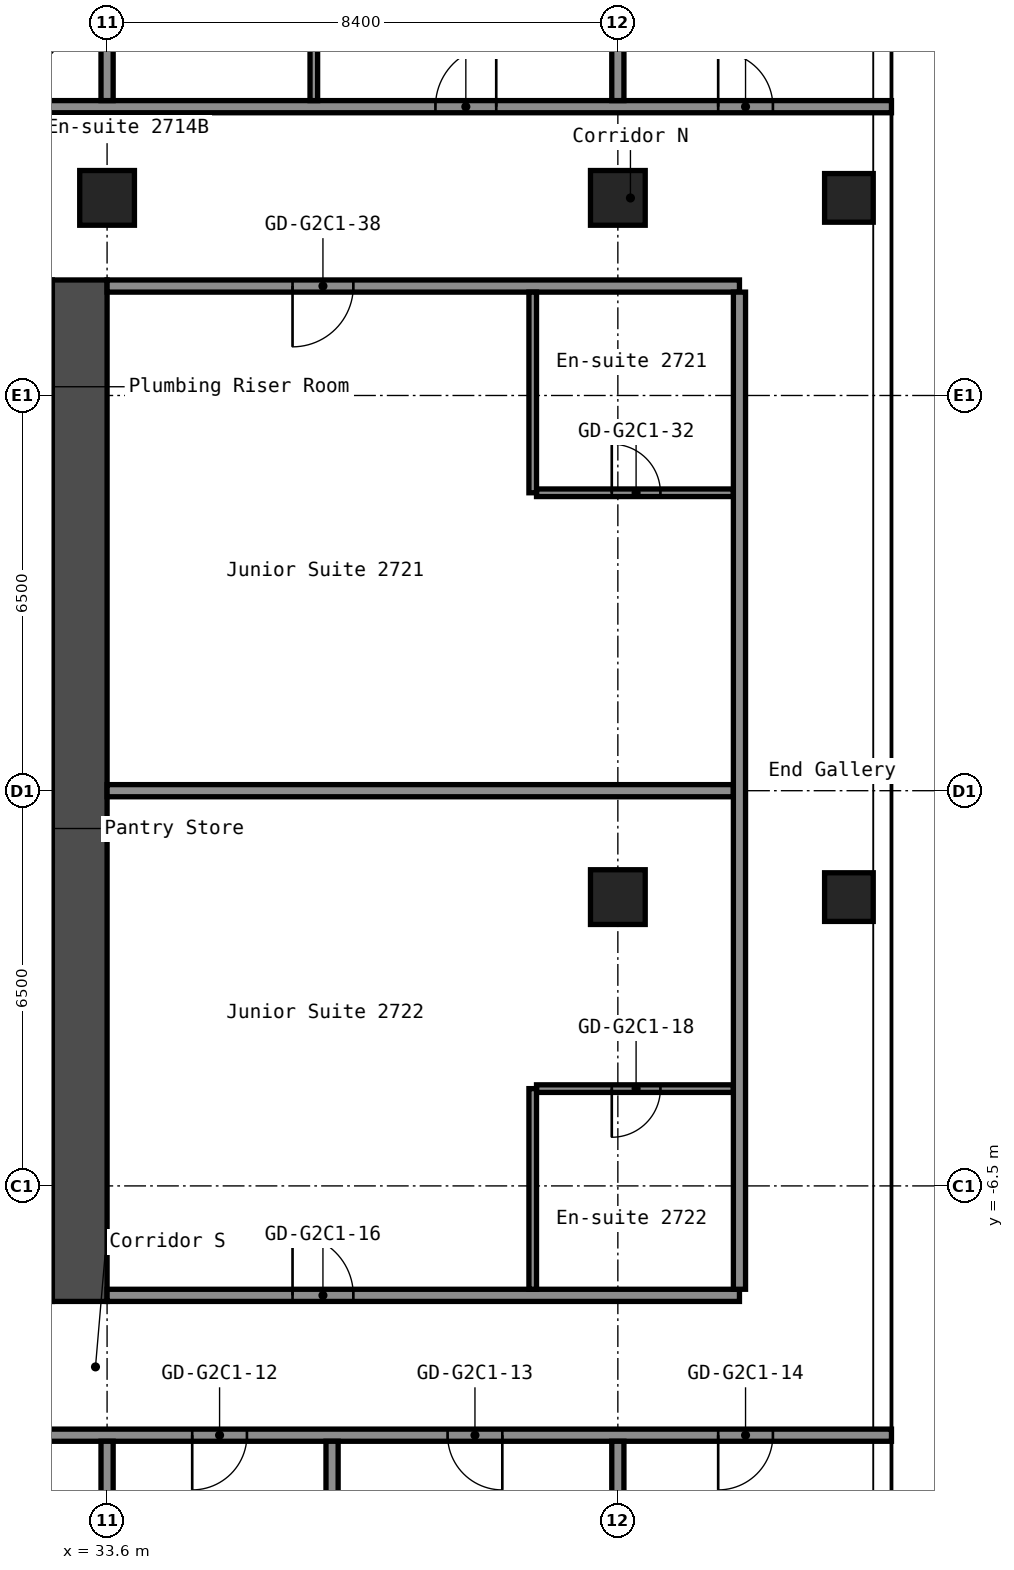
"""IFC4 building model, lengths in metres.
Left out: names, types, materials, properties, quantities, classifications, styles, units other than length and angle.
Written with IfcOpenShell. Run it as: python <this file> out.ifc"""

import sys

from ifc_helpers import new_model, si_unit, direction, frame, frame_2d, origin, origin_2d, place, context, subcontext, project, spatial, rectangle, hollow_rectangle, extrude, element, fill, save


model = new_model("IFC4")
c1 = context("Model", 3, precision=1e-05, world=origin(), true_north=direction((0.0, 1.0)))
c2 = subcontext(c1, "Body", "Model", "MODEL_VIEW")
j1 = project(units=[si_unit("LENGTHUNIT", "METRE"), si_unit("PLANEANGLEUNIT", "RADIAN")], contexts=[c1])
p1 = place(None, origin())
s1 = spatial("IfcSite", under=j1, at=p1, CompositionType="ELEMENT")
p2 = place(p1, origin())
s2 = spatial("IfcBuilding", under=s1, at=p2, CompositionType="ELEMENT")
p3 = place(p2, frame((0.0, 0.0, 97.8)))
s3 = spatial("IfcBuildingStorey", under=s2, at=p3, CompositionType="ELEMENT", Elevation=97.8)
for number, where, z_axis, x_axis in (
    (1, (33.6, 9.75, 0.0), (0.0, 0.0, 1.0), (1.0, 0.0, 0.0)),
    (2, (42.0, -1.75, 0.0), (0.0, 0.0, 1.0), (1.0, 0.0, 0.0)),
    (3, (42.0, 9.75, 0.0), (0.0, 0.0, 1.0), (1.0, 0.0, 0.0)),
):
    element("IfcColumn", number, at=place(p3, frame(where, z_axis=z_axis, x_axis=x_axis)), inside=s3, PredefinedType="COLUMN", context=c2, shape_type="SweptSolid", body=[
        extrude(hollow_rectangle(XDim=0.9, YDim=0.9, WallThickness=0.036, at=origin_2d()), origin(), (0.0, 0.0, 1.0), 2.8),
    ])
for number, where, z_axis, x_axis in (
    (4, (45.8, -1.75, 0.0), (0.0, 0.0, 1.0), (1.0, 0.0, 0.0)),
    (5, (45.8, 9.75, 0.0), (0.0, 0.0, 1.0), (1.0, 0.0, 0.0)),
):
    element("IfcColumn", number, at=place(p3, frame(where, z_axis=z_axis, x_axis=x_axis)), inside=s3, PredefinedType="COLUMN", context=c2, shape_type="SweptSolid", body=[
        extrude(hollow_rectangle(XDim=0.8, YDim=0.8, WallThickness=0.032, at=origin_2d()), origin(), (0.0, 0.0, 1.0), 2.8),
    ])
p4 = place(p3, frame((33.15, -8.4, 0.0), z_axis=(0.0, 0.0, 1.0), x_axis=(0.0, 1.0, 0.0)))
e6 = element("IfcWall", 6, at=p4, inside=s3, PredefinedType="SHEAR", context=c2, shape_type="SweptSolid", body=[
    extrude(rectangle(XDim=16.8, YDim=0.9, at=frame_2d((8.4, 0.0))), origin(), (0.0, 0.0, 1.0), 2.8),
])
p5 = place(p3, frame((16.8, -10.6, 0.0), z_axis=(0.0, 0.0, 1.0), x_axis=(1.0, 0.0, 0.0)))
e7 = element("IfcWall", 7, at=p5, inside=s3, PredefinedType="PARTITIONING", context=c2, shape_type="SweptSolid", body=[
    extrude(rectangle(XDim=29.7, YDim=0.2, at=frame_2d((14.85, 0.0))), origin(), (0.0, 0.0, 1.0), 2.8),
])
p6 = place(p5, frame((2.155, 0.0, 0.0)))
e8 = element("IfcOpeningElement", 8, at=p6, cuts=e7, PredefinedType="OPENING", context=c2, shape_type="SweptSolid", body=[
    extrude(rectangle(XDim=0.9, YDim=2.1, at=frame_2d((0.45, 1.05))), frame((0.0, 0.11, 0.0), z_axis=(0.0, -1.0, 0.0), x_axis=(1.0, 0.0, 0.0)), (0.0, 0.0, 1.0), 0.22),
])
p7 = place(p5, frame((6.355, 0.0, 0.0)))
e9 = element("IfcOpeningElement", 9, at=p7, cuts=e7, PredefinedType="OPENING", context=c2, shape_type="SweptSolid", body=[
    extrude(rectangle(XDim=0.9, YDim=2.1, at=frame_2d((0.45, 1.05))), frame((0.0, 0.11, 0.0), z_axis=(0.0, -1.0, 0.0), x_axis=(1.0, 0.0, 0.0)), (0.0, 0.0, 1.0), 0.22),
])
p8 = place(p5, frame((10.22, 0.0, 0.0)))
e10 = element("IfcOpeningElement", 10, at=p8, cuts=e7, PredefinedType="OPENING", context=c2, shape_type="SweptSolid", body=[
    extrude(rectangle(XDim=0.9, YDim=2.1, at=frame_2d((0.45, 1.05))), frame((0.0, 0.11, 0.0), z_axis=(0.0, -1.0, 0.0), x_axis=(1.0, 0.0, 0.0)), (0.0, 0.0, 1.0), 0.22),
])
p9 = place(p5, frame((14.42, 0.0, 0.0)))
e11 = element("IfcOpeningElement", 11, at=p9, cuts=e7, PredefinedType="OPENING", context=c2, shape_type="SweptSolid", body=[
    extrude(rectangle(XDim=0.9, YDim=2.1, at=frame_2d((0.45, 1.05))), frame((0.0, 0.11, 0.0), z_axis=(0.0, -1.0, 0.0), x_axis=(1.0, 0.0, 0.0)), (0.0, 0.0, 1.0), 0.22),
])
p10 = place(p5, frame((18.2, 0.0, 0.0)))
e12 = element("IfcOpeningElement", 12, at=p10, cuts=e7, PredefinedType="OPENING", context=c2, shape_type="SweptSolid", body=[
    extrude(rectangle(XDim=0.9, YDim=2.1, at=frame_2d((0.45, 1.05))), frame((0.0, 0.11, 0.0), z_axis=(0.0, -1.0, 0.0), x_axis=(1.0, 0.0, 0.0)), (0.0, 0.0, 1.0), 0.22),
])
p11 = place(p5, frame((22.4, 0.0, 0.0)))
e13 = element("IfcOpeningElement", 13, at=p11, cuts=e7, PredefinedType="OPENING", context=c2, shape_type="SweptSolid", body=[
    extrude(rectangle(XDim=0.9, YDim=2.1, at=frame_2d((0.45, 1.05))), frame((0.0, 0.11, 0.0), z_axis=(0.0, -1.0, 0.0), x_axis=(1.0, 0.0, 0.0)), (0.0, 0.0, 1.0), 0.22),
])
p12 = place(p5, frame((26.85, 0.0, 0.0)))
e14 = element("IfcOpeningElement", 14, at=p12, cuts=e7, PredefinedType="OPENING", context=c2, shape_type="SweptSolid", body=[
    extrude(rectangle(XDim=0.9, YDim=2.1, at=frame_2d((0.45, 1.05))), frame((0.0, 0.11, 0.0), z_axis=(0.0, -1.0, 0.0), x_axis=(1.0, 0.0, 0.0)), (0.0, 0.0, 1.0), 0.22),
])
p13 = place(p3, frame((33.6, -8.3, 0.0), z_axis=(0.0, 0.0, 1.0), x_axis=(1.0, 0.0, 0.0)))
e15 = element("IfcWall", 15, at=p13, inside=s3, PredefinedType="PARTITIONING", context=c2, shape_type="SweptSolid", body=[
    extrude(rectangle(XDim=10.4, YDim=0.2, at=frame_2d((5.2, 0.0))), origin(), (0.0, 0.0, 1.0), 2.8),
])
p14 = place(p13, frame((3.05, 0.0, 0.0)))
e16 = element("IfcOpeningElement", 16, at=p14, cuts=e15, PredefinedType="OPENING", context=c2, shape_type="SweptSolid", body=[
    extrude(rectangle(XDim=1.0, YDim=2.1, at=frame_2d((0.5, 1.05))), frame((0.0, 0.11, 0.0), z_axis=(0.0, -1.0, 0.0), x_axis=(1.0, 0.0, 0.0)), (0.0, 0.0, 1.0), 0.22),
])
p15 = place(p3, frame((40.663, -4.9, 0.0), z_axis=(0.0, 0.0, 1.0), x_axis=(1.0, 0.0, 0.0)))
e17 = element("IfcWall", 17, at=p15, inside=s3, PredefinedType="PARTITIONING", context=c2, shape_type="SweptSolid", body=[
    extrude(rectangle(XDim=3.237, YDim=0.125, at=frame_2d((1.619, 0.0))), origin(), (0.0, 0.0, 1.0), 2.8),
])
p16 = place(p15, frame((1.238, 0.0, 0.0)))
e18 = element("IfcOpeningElement", 18, at=p16, cuts=e17, PredefinedType="OPENING", context=c2, shape_type="SweptSolid", body=[
    extrude(rectangle(XDim=0.8, YDim=2.1, at=frame_2d((0.4, 1.05))), frame((0.0, 0.073, 0.0), z_axis=(0.0, -1.0, 0.0), x_axis=(1.0, 0.0, 0.0)), (0.0, 0.0, 1.0), 0.145),
])
p17 = place(p3, frame((33.6, 0.0, 0.0), z_axis=(0.0, 0.0, 1.0), x_axis=(1.0, 0.0, 0.0)))
e19 = element("IfcWall", 19, at=p17, inside=s3, PredefinedType="PARTITIONING", context=c2, shape_type="SweptSolid", body=[
    extrude(rectangle(XDim=10.3, YDim=0.2, at=frame_2d((5.15, 0.0))), origin(), (0.0, 0.0, 1.0), 2.8),
])
p18 = place(p3, frame((40.663, 4.9, 0.0), z_axis=(0.0, 0.0, 1.0), x_axis=(1.0, 0.0, 0.0)))
e20 = element("IfcWall", 20, at=p18, inside=s3, PredefinedType="PARTITIONING", context=c2, shape_type="SweptSolid", body=[
    extrude(rectangle(XDim=3.237, YDim=0.125, at=frame_2d((1.619, 0.0))), origin(), (0.0, 0.0, 1.0), 2.8),
])
p19 = place(p18, frame((1.238, 0.0, 0.0)))
e21 = element("IfcOpeningElement", 21, at=p19, cuts=e20, PredefinedType="OPENING", context=c2, shape_type="SweptSolid", body=[
    extrude(rectangle(XDim=0.8, YDim=2.1, at=frame_2d((0.4, 1.05))), frame((0.0, 0.073, 0.0), z_axis=(0.0, -1.0, 0.0), x_axis=(1.0, 0.0, 0.0)), (0.0, 0.0, 1.0), 0.145),
])
p20 = place(p3, frame((33.6, 8.3, 0.0), z_axis=(0.0, 0.0, 1.0), x_axis=(1.0, 0.0, 0.0)))
e22 = element("IfcWall", 22, at=p20, inside=s3, PredefinedType="PARTITIONING", context=c2, shape_type="SweptSolid", body=[
    extrude(rectangle(XDim=10.4, YDim=0.2, at=frame_2d((5.2, 0.0))), origin(), (0.0, 0.0, 1.0), 2.8),
])
p21 = place(p20, frame((3.05, 0.0, 0.0)))
e23 = element("IfcOpeningElement", 23, at=p21, cuts=e22, PredefinedType="OPENING", context=c2, shape_type="SweptSolid", body=[
    extrude(rectangle(XDim=1.0, YDim=2.1, at=frame_2d((0.5, 1.05))), frame((0.0, 0.11, 0.0), z_axis=(0.0, -1.0, 0.0), x_axis=(1.0, 0.0, 0.0)), (0.0, 0.0, 1.0), 0.22),
])
p22 = place(p3, frame((16.8, 11.25, 0.0), z_axis=(0.0, 0.0, 1.0), x_axis=(1.0, 0.0, 0.0)))
e24 = element("IfcWall", 24, at=p22, inside=s3, PredefinedType="PARTITIONING", context=c2, shape_type="SweptSolid", body=[
    extrude(rectangle(XDim=29.7, YDim=0.2, at=frame_2d((14.85, 0.0))), origin(), (0.0, 0.0, 1.0), 2.8),
])
p23 = place(p22, frame((2.0, 0.0, 0.0)))
e25 = element("IfcOpeningElement", 25, at=p23, cuts=e24, PredefinedType="OPENING", context=c2, shape_type="SweptSolid", body=[
    extrude(rectangle(XDim=1.0, YDim=2.1, at=frame_2d((0.5, 1.05))), frame((0.0, 0.11, 0.0), z_axis=(0.0, -1.0, 0.0), x_axis=(1.0, 0.0, 0.0)), (0.0, 0.0, 1.0), 0.22),
])
p24 = place(p22, frame((11.25, 0.0, 0.0)))
e26 = element("IfcOpeningElement", 26, at=p24, cuts=e24, PredefinedType="OPENING", context=c2, shape_type="SweptSolid", body=[
    extrude(rectangle(XDim=1.0, YDim=2.1, at=frame_2d((0.5, 1.05))), frame((0.0, 0.11, 0.0), z_axis=(0.0, -1.0, 0.0), x_axis=(1.0, 0.0, 0.0)), (0.0, 0.0, 1.0), 0.22),
])
p25 = place(p22, frame((12.95, 0.0, 0.0)))
e27 = element("IfcOpeningElement", 27, at=p25, cuts=e24, PredefinedType="OPENING", context=c2, shape_type="SweptSolid", body=[
    extrude(rectangle(XDim=1.0, YDim=2.1, at=frame_2d((0.5, 1.05))), frame((0.0, 0.11, 0.0), z_axis=(0.0, -1.0, 0.0), x_axis=(1.0, 0.0, 0.0)), (0.0, 0.0, 1.0), 0.22),
])
p26 = place(p22, frame((22.2, 0.0, 0.0)))
e28 = element("IfcOpeningElement", 28, at=p26, cuts=e24, PredefinedType="OPENING", context=c2, shape_type="SweptSolid", body=[
    extrude(rectangle(XDim=1.0, YDim=2.1, at=frame_2d((0.5, 1.05))), frame((0.0, 0.11, 0.0), z_axis=(0.0, -1.0, 0.0), x_axis=(1.0, 0.0, 0.0)), (0.0, 0.0, 1.0), 0.22),
])
p27 = place(p22, frame((26.85, 0.0, 0.0)))
e29 = element("IfcOpeningElement", 29, at=p27, cuts=e24, PredefinedType="OPENING", context=c2, shape_type="SweptSolid", body=[
    extrude(rectangle(XDim=0.9, YDim=2.1, at=frame_2d((0.45, 1.05))), frame((0.0, 0.11, 0.0), z_axis=(0.0, -1.0, 0.0), x_axis=(1.0, 0.0, 0.0)), (0.0, 0.0, 1.0), 0.22),
])
p28 = place(p3, frame((33.6, -15.55, 0.0), z_axis=(0.0, 0.0, 1.0), x_axis=(0.0, 1.0, 0.0)))
e30 = element("IfcWall", 30, at=p28, inside=s3, PredefinedType="PARTITIONING", context=c2, shape_type="SweptSolid", body=[
    extrude(rectangle(XDim=4.85, YDim=0.2, at=frame_2d((2.425, 0.0))), origin(), (0.0, 0.0, 1.0), 2.8),
])
p29 = place(p3, frame((33.6, 11.35, 0.0), z_axis=(0.0, 0.0, 1.0), x_axis=(0.0, 1.0, 0.0)))
e31 = element("IfcWall", 31, at=p29, inside=s3, PredefinedType="PARTITIONING", context=c2, shape_type="SweptSolid", body=[
    extrude(rectangle(XDim=12.2, YDim=0.2, at=frame_2d((6.1, 0.0))), origin(), (0.0, 0.0, 1.0), 2.8),
])
p30 = place(p3, frame((37.0, 11.35, 0.0), z_axis=(0.0, 0.0, 1.0), x_axis=(0.0, 1.0, 0.0)))
e32 = element("IfcWall", 32, at=p30, inside=s3, PredefinedType="PARTITIONING", context=c2, shape_type="SweptSolid", body=[
    extrude(rectangle(XDim=3.3, YDim=0.125, at=frame_2d((1.65, 0.0))), origin(), (0.0, 0.0, 1.0), 2.8),
])
p31 = place(p3, frame((37.3, -15.55, 0.0), z_axis=(0.0, 0.0, 1.0), x_axis=(0.0, 1.0, 0.0)))
e33 = element("IfcWall", 33, at=p31, inside=s3, PredefinedType="PARTITIONING", context=c2, shape_type="SweptSolid", body=[
    extrude(rectangle(XDim=4.85, YDim=0.2, at=frame_2d((2.425, 0.0))), origin(), (0.0, 0.0, 1.0), 2.8),
])
for number, where, z_axis, x_axis in (
    (34, (40.6, -8.2, 0.0), (0.0, 0.0, 1.0), (0.0, 1.0, 0.0)),
    (35, (40.6, 4.9, 0.0), (0.0, 0.0, 1.0), (0.0, 1.0, 0.0)),
):
    element("IfcWall", number, at=place(p3, frame(where, z_axis=z_axis, x_axis=x_axis)), inside=s3, PredefinedType="PARTITIONING", context=c2, shape_type="SweptSolid", body=[
        extrude(rectangle(XDim=3.3, YDim=0.125, at=frame_2d((1.65, 0.0))), origin(), (0.0, 0.0, 1.0), 2.8),
    ])
p32 = place(p3, frame((42.0, -15.55, 0.0), z_axis=(0.0, 0.0, 1.0), x_axis=(0.0, 1.0, 0.0)))
e36 = element("IfcWall", 36, at=p32, inside=s3, PredefinedType="PARTITIONING", context=c2, shape_type="SweptSolid", body=[
    extrude(rectangle(XDim=4.85, YDim=0.2, at=frame_2d((2.425, 0.0))), origin(), (0.0, 0.0, 1.0), 2.8),
])
p33 = place(p3, frame((42.0, 11.35, 0.0), z_axis=(0.0, 0.0, 1.0), x_axis=(0.0, 1.0, 0.0)))
e37 = element("IfcWall", 37, at=p33, inside=s3, PredefinedType="PARTITIONING", context=c2, shape_type="SweptSolid", body=[
    extrude(rectangle(XDim=12.2, YDim=0.2, at=frame_2d((6.1, 0.0))), origin(), (0.0, 0.0, 1.0), 2.8),
])
p34 = place(p3, frame((44.0, -8.2, 0.0), z_axis=(0.0, 0.0, 1.0), x_axis=(0.0, 1.0, 0.0)))
e38 = element("IfcWall", 38, at=p34, inside=s3, PredefinedType="PARTITIONING", context=c2, shape_type="SweptSolid", body=[
    extrude(rectangle(XDim=16.4, YDim=0.2, at=frame_2d((8.2, 0.0))), origin(), (0.0, 0.0, 1.0), 2.8),
])
p35 = place(p10, origin())
e39 = element("IfcDoor", 39, at=p35, inside=s3, OperationType="SINGLE_SWING_LEFT", PredefinedType="DOOR", context=c2, shape_type="SweptSolid", body=[
    extrude(rectangle(XDim=0.9, YDim=2.1, at=frame_2d((0.45, 1.05))), frame((0.0, 0.025, 0.0), z_axis=(0.0, -1.0, 0.0), x_axis=(1.0, 0.0, 0.0)), (0.0, 0.0, 1.0), 0.05),
])
fill(e12, e39)
p36 = place(p11, origin())
e40 = element("IfcDoor", 40, at=p36, inside=s3, OperationType="SINGLE_SWING_RIGHT", PredefinedType="DOOR", context=c2, shape_type="SweptSolid", body=[
    extrude(rectangle(XDim=0.9, YDim=2.1, at=frame_2d((0.45, 1.05))), frame((0.0, 0.025, 0.0), z_axis=(0.0, -1.0, 0.0), x_axis=(1.0, 0.0, 0.0)), (0.0, 0.0, 1.0), 0.05),
])
fill(e13, e40)
p37 = place(p12, origin())
e41 = element("IfcDoor", 41, at=p37, inside=s3, OperationType="SINGLE_SWING_LEFT", PredefinedType="DOOR", context=c2, shape_type="SweptSolid", body=[
    extrude(rectangle(XDim=0.9, YDim=2.1, at=frame_2d((0.45, 1.05))), frame((0.0, 0.025, 0.0), z_axis=(0.0, -1.0, 0.0), x_axis=(1.0, 0.0, 0.0)), (0.0, 0.0, 1.0), 0.05),
])
fill(e14, e41)
p38 = place(p14, origin())
e42 = element("IfcDoor", 42, at=p38, inside=s3, OperationType="SINGLE_SWING_RIGHT", PredefinedType="DOOR", context=c2, shape_type="SweptSolid", body=[
    extrude(rectangle(XDim=1.0, YDim=2.1, at=frame_2d((0.5, 1.05))), frame((0.0, 0.025, 0.0), z_axis=(0.0, -1.0, 0.0), x_axis=(1.0, 0.0, 0.0)), (0.0, 0.0, 1.0), 0.05),
])
fill(e16, e42)
p39 = place(p16, origin())
e43 = element("IfcDoor", 43, at=p39, inside=s3, OperationType="SINGLE_SWING_LEFT", PredefinedType="DOOR", context=c2, shape_type="SweptSolid", body=[
    extrude(rectangle(XDim=0.8, YDim=2.1, at=frame_2d((0.4, 1.05))), frame((0.0, 0.025, 0.0), z_axis=(0.0, -1.0, 0.0), x_axis=(1.0, 0.0, 0.0)), (0.0, 0.0, 1.0), 0.05),
])
fill(e18, e43)
p40 = place(p19, origin())
e44 = element("IfcDoor", 44, at=p40, inside=s3, OperationType="SINGLE_SWING_RIGHT", PredefinedType="DOOR", context=c2, shape_type="SweptSolid", body=[
    extrude(rectangle(XDim=0.8, YDim=2.1, at=frame_2d((0.4, 1.05))), frame((0.0, 0.025, 0.0), z_axis=(0.0, -1.0, 0.0), x_axis=(1.0, 0.0, 0.0)), (0.0, 0.0, 1.0), 0.05),
])
fill(e21, e44)
p41 = place(p21, origin())
e45 = element("IfcDoor", 45, at=p41, inside=s3, OperationType="SINGLE_SWING_LEFT", PredefinedType="DOOR", context=c2, shape_type="SweptSolid", body=[
    extrude(rectangle(XDim=1.0, YDim=2.1, at=frame_2d((0.5, 1.05))), frame((0.0, 0.025, 0.0), z_axis=(0.0, -1.0, 0.0), x_axis=(1.0, 0.0, 0.0)), (0.0, 0.0, 1.0), 0.05),
])
fill(e23, e45)
p42 = place(p26, origin())
e46 = element("IfcDoor", 46, at=p42, inside=s3, OperationType="SINGLE_SWING_LEFT", PredefinedType="DOOR", context=c2, shape_type="SweptSolid", body=[
    extrude(rectangle(XDim=1.0, YDim=2.1, at=frame_2d((0.5, 1.05))), frame((0.0, 0.025, 0.0), z_axis=(0.0, -1.0, 0.0), x_axis=(1.0, 0.0, 0.0)), (0.0, 0.0, 1.0), 0.05),
])
fill(e28, e46)
p43 = place(p27, origin())
e47 = element("IfcDoor", 47, at=p43, inside=s3, OperationType="SINGLE_SWING_RIGHT", PredefinedType="DOOR", context=c2, shape_type="SweptSolid", body=[
    extrude(rectangle(XDim=0.9, YDim=2.1, at=frame_2d((0.45, 1.05))), frame((0.0, 0.025, 0.0), z_axis=(0.0, -1.0, 0.0), x_axis=(1.0, 0.0, 0.0)), (0.0, 0.0, 1.0), 0.05),
])
fill(e29, e47)
save(model, sys.argv[1])
